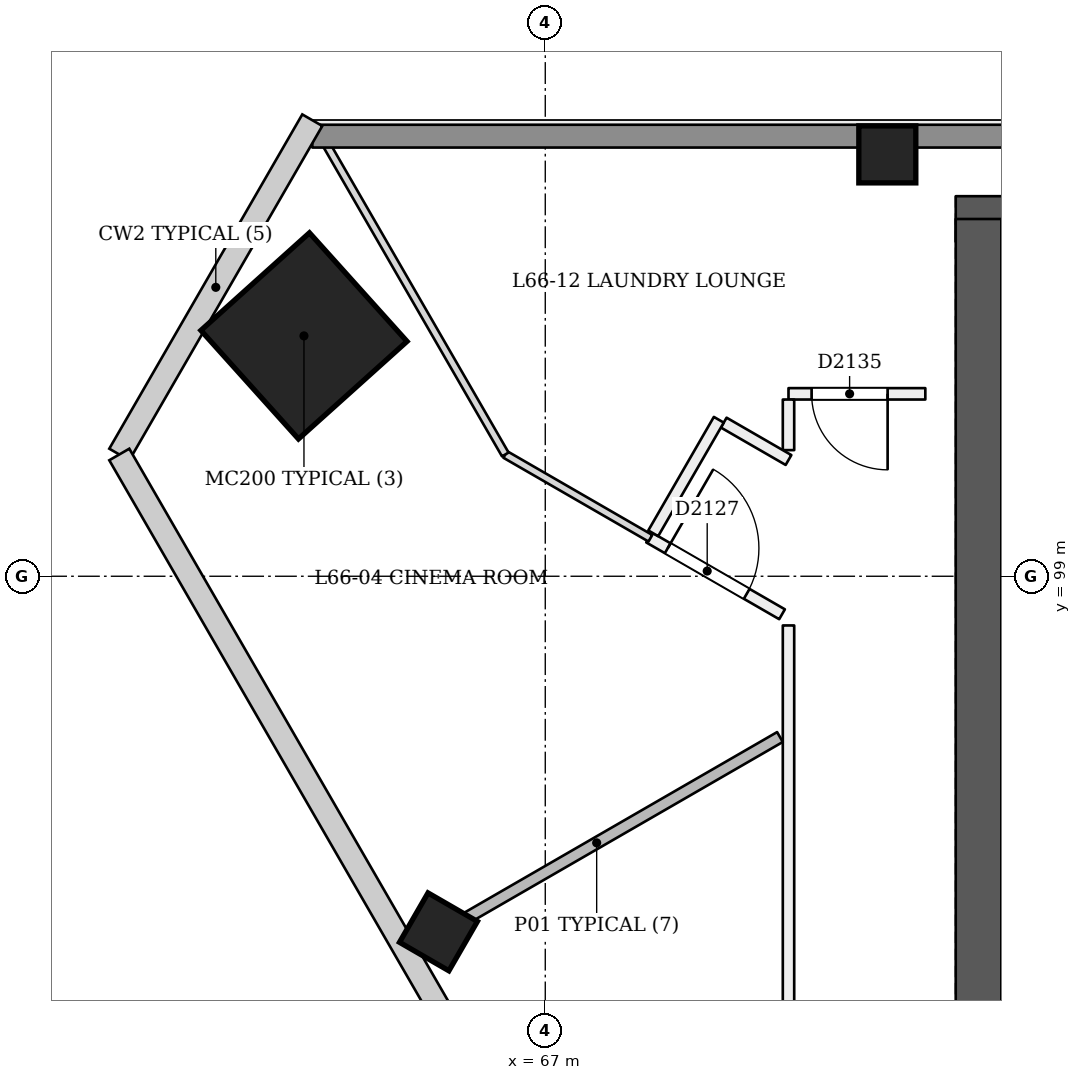
"""IFC4 building model, lengths in metres.
Left out: names, types, materials, properties, quantities, classifications, styles, units other than length and angle.
Written with IfcOpenShell. Run it as: python <this file> out.ifc"""

import sys

from ifc_helpers import new_model, si_unit, direction, frame, frame_2d, origin, origin_2d, place, context, subcontext, project, spatial, rectangle, extrude, element, fill, save


model = new_model("IFC4")
c1 = context("Model", 3, precision=1e-05, world=origin(), true_north=direction((0.0, 1.0)))
c2 = subcontext(c1, "Body", "Model", "MODEL_VIEW")
j1 = project(units=[si_unit("LENGTHUNIT", "METRE"), si_unit("PLANEANGLEUNIT", "RADIAN")], contexts=[c1])
p1 = place(None, origin())
s1 = spatial("IfcSite", under=j1, at=p1, CompositionType="ELEMENT")
p2 = place(p1, origin())
s2 = spatial("IfcBuilding", under=s1, at=p2, CompositionType="ELEMENT")
p3 = place(p2, frame((0.0, 0.0, 257.2)))
s3 = spatial("IfcBuildingStorey", under=s2, at=p3, CompositionType="ELEMENT", Elevation=257.2)
p4 = place(p3, frame((97.3, 103.7, 0.0), z_axis=(0.0, 0.0, 1.0), x_axis=(-1.0, 0.0, 0.0)))
e1 = element("IfcWall", 1, at=p4, inside=s3, PredefinedType="SHEAR", context=c2, shape_type="SweptSolid", body=[
    extrude(rectangle(XDim=24.9, YDim=0.6, at=frame_2d((12.45, 0.0))), origin(), (0.0, 0.0, 1.0), 3.6),
])
p5 = place(p3, frame((72.7, 103.7, 0.0), z_axis=(0.0, 0.0, 1.0), x_axis=(0.0, -1.0, 0.0)))
e2 = element("IfcWall", 2, at=p5, inside=s3, PredefinedType="SHEAR", context=c2, shape_type="SweptSolid", body=[
    extrude(rectangle(XDim=10.9, YDim=0.6, at=frame_2d((5.45, 0.0))), origin(), (0.0, 0.0, 1.0), 3.6),
])
p6 = place(p3, frame((63.791, 102.151, 0.0), z_axis=(0.028401814599, 0.009218727412, 0.999554076572), x_axis=(-0.865127412315, 0.50115482208, 0.019960079341)))
e3 = element("IfcColumn", 3, at=p6, inside=s3, PredefinedType="COLUMN", context=c2, shape_type="SweptSolid", body=[
    extrude(rectangle(XDim=1.92, YDim=1.92, at=origin_2d()), origin(), (0.0, 0.0, 1.0), 3.602),
])
p7 = place(p3, frame((71.5, 104.55, 0.0), z_axis=(0.0, 0.0, 1.0), x_axis=(1.0, 0.0, 0.0)))
e4 = element("IfcColumn", 4, at=p7, inside=s3, PredefinedType="COLUMN", context=c2, shape_type="SweptSolid", body=[
    extrude(rectangle(XDim=0.75, YDim=0.75, at=origin_2d()), origin(), (0.0, 0.0, 1.0), 3.6),
])
p8 = place(p3, frame((65.568, 94.275, -0.023), z_axis=(0.022153634206, 0.038480930364, 0.999013730882), x_axis=(-0.864979737564, -0.50033126583, 0.038453582882)))
e5 = element("IfcColumn", 5, at=p8, inside=s3, PredefinedType="COLUMN", context=c2, shape_type="SweptSolid", body=[
    extrude(rectangle(XDim=0.75, YDim=0.75, at=origin_2d()), origin(), (0.0, 0.0, 1.0), 3.604),
])
p9 = place(p3, frame((68.366, 99.51, 0.0), z_axis=(0.0, 0.0, 1.0), x_axis=(0.866010470582, -0.500025864173, 0.0)))
e6 = element("IfcWall", 6, at=p9, inside=s3, PredefinedType="PARTITIONING", context=c2, shape_type="SweptSolid", body=[
    extrude(rectangle(XDim=2.02, YDim=0.15, at=frame_2d((1.01, 0.0))), origin(), (0.0, 0.0, 1.0), 3.2),
])
p10 = place(p9, frame((0.283, 0.0, 0.0)))
e7 = element("IfcOpeningElement", 7, at=p10, cuts=e6, PredefinedType="OPENING", context=c2, shape_type="SweptSolid", body=[
    extrude(rectangle(XDim=1.2, YDim=2.1, at=frame_2d((0.6, 1.05))), frame((0.0, 0.085, 0.0), z_axis=(0.0, -1.0, 0.0), x_axis=(1.0, 0.0, 0.0)), (0.0, 0.0, 1.0), 0.171),
])
p11 = place(p3, frame((70.2, 98.353, 0.0), z_axis=(0.0, 0.0, 1.0), x_axis=(0.0, -1.0, 0.0)))
e8 = element("IfcWall", 8, at=p11, inside=s3, PredefinedType="PARTITIONING", context=c2, shape_type="SweptSolid", body=[
    extrude(rectangle(XDim=7.753, YDim=0.15, at=frame_2d((3.876, 0.0))), origin(), (0.0, 0.0, 1.0), 3.2),
])
p12 = place(p3, frame((72.0, 101.4, 0.0), z_axis=(0.0, 0.0, 1.0), x_axis=(-1.0, 0.0, 0.0)))
e9 = element("IfcWall", 9, at=p12, inside=s3, PredefinedType="PARTITIONING", context=c2, shape_type="SweptSolid", body=[
    extrude(rectangle(XDim=1.8, YDim=0.15, at=frame_2d((0.9, 0.0))), origin(), (0.0, 0.0, 1.0), 3.2),
])
p13 = place(p12, frame((0.496, 0.0, 0.0)))
e10 = element("IfcOpeningElement", 10, at=p13, cuts=e9, PredefinedType="OPENING", context=c2, shape_type="SweptSolid", body=[
    extrude(rectangle(XDim=1.0, YDim=2.1, at=frame_2d((0.5, 1.05))), frame((0.0, 0.085, 0.0), z_axis=(0.0, -1.0, 0.0), x_axis=(1.0, 0.0, 0.0)), (0.0, 0.0, 1.0), 0.171),
])
p14 = place(p3, frame((70.2, 101.325, 0.0), z_axis=(0.0, 0.0, 1.0), x_axis=(0.0, -1.0, 0.0)))
e11 = element("IfcWall", 11, at=p14, inside=s3, PredefinedType="PARTITIONING", context=c2, shape_type="SweptSolid", body=[
    extrude(rectangle(XDim=0.666, YDim=0.15, at=frame_2d((0.333, 0.0))), origin(), (0.0, 0.0, 1.0), 3.2),
])
p15 = place(p3, frame((70.2, 100.529, 0.0), z_axis=(0.0, 0.0, 1.0), x_axis=(-0.866020293397, 0.500008851346, 0.0)))
e12 = element("IfcWall", 12, at=p15, inside=s3, PredefinedType="PARTITIONING", context=c2, shape_type="SweptSolid", body=[
    extrude(rectangle(XDim=0.984, YDim=0.15, at=frame_2d((0.492, 0.0))), origin(), (0.0, 0.0, 1.0), 3.2),
])
p16 = place(p3, frame((69.283, 101.059, 0.0), z_axis=(0.0, 0.0, 1.0), x_axis=(-0.500020560727, -0.866013532718, 0.0)))
e13 = element("IfcWall", 13, at=p16, inside=s3, PredefinedType="PARTITIONING", context=c2, shape_type="SweptSolid", body=[
    extrude(rectangle(XDim=1.725, YDim=0.15, at=frame_2d((0.863, 0.0))), origin(), (0.0, 0.0, 1.0), 3.2),
])
p17 = place(p3, frame((65.265, 94.101, 0.0), z_axis=(0.0, 0.0, 1.0), x_axis=(0.866014010515, 0.500019733201, 0.0)))
e14 = element("IfcWall", 14, at=p17, inside=s3, PredefinedType="PARTITIONING", context=c2, shape_type="SweptSolid", body=[
    extrude(rectangle(XDim=5.569, YDim=0.15, at=frame_2d((2.784, 0.0))), origin(), (0.0, 0.0, 1.0), 2.7),
])
p18 = place(p3, frame((68.383, 99.5, 0.0), z_axis=(0.0, 0.0, 1.0), x_axis=(-0.866039875853, 0.499974932805, 0.0)))
e15 = element("IfcWall", 15, at=p18, inside=s3, PredefinedType="PARTITIONING", context=c2, shape_type="SweptSolid", body=[
    extrude(rectangle(XDim=2.204, YDim=0.1, at=frame_2d((1.102, 0.0))), origin(), (0.0, 0.0, 1.0), 3.2),
])
p19 = place(p3, frame((66.474, 100.602, 0.0), z_axis=(0.0, 0.0, 1.0), x_axis=(-0.500012022864, 0.866018462269, 0.0)))
e16 = element("IfcWall", 16, at=p19, inside=s3, PredefinedType="PARTITIONING", context=c2, shape_type="SweptSolid", body=[
    extrude(rectangle(XDim=4.963, YDim=0.1, at=frame_2d((2.481, 0.0))), origin(), (0.0, 0.0, 1.0), 2.7),
])
p20 = place(p3, frame((63.935, 104.79, 0.0), z_axis=(0.0, 0.0, 1.0), x_axis=(1.0, 0.0, 0.0)))
e17 = element("IfcWall", 17, at=p20, inside=s3, PredefinedType="SOLIDWALL", context=c2, shape_type="SweptSolid", body=[
    extrude(rectangle(XDim=42.13, YDim=0.3, at=frame_2d((21.065, 0.0))), origin(), (0.0, 0.0, 1.0), 2.7),
])
p21 = place(p10, origin())
e18 = element("IfcDoor", 18, at=p21, inside=s3, OperationType="SINGLE_SWING_LEFT", PredefinedType="NOTDEFINED", context=c2, shape_type="SweptSolid", body=[
    extrude(rectangle(XDim=1.2, YDim=2.1, at=frame_2d((0.6, 1.05))), frame((0.0, 0.025, 0.0), z_axis=(0.0, -1.0, 0.0), x_axis=(1.0, 0.0, 0.0)), (0.0, 0.0, 1.0), 0.05),
])
fill(e7, e18)
p22 = place(p13, origin())
e19 = element("IfcDoor", 19, at=p22, inside=s3, OperationType="SINGLE_SWING_LEFT", PredefinedType="NOTDEFINED", context=c2, shape_type="SweptSolid", body=[
    extrude(rectangle(XDim=1.0, YDim=2.1, at=frame_2d((0.5, 1.05))), frame((0.0, 0.025, 0.0), z_axis=(0.0, -1.0, 0.0), x_axis=(1.0, 0.0, 0.0)), (0.0, 0.0, 1.0), 0.05),
])
fill(e10, e19)
save(model, sys.argv[1])
